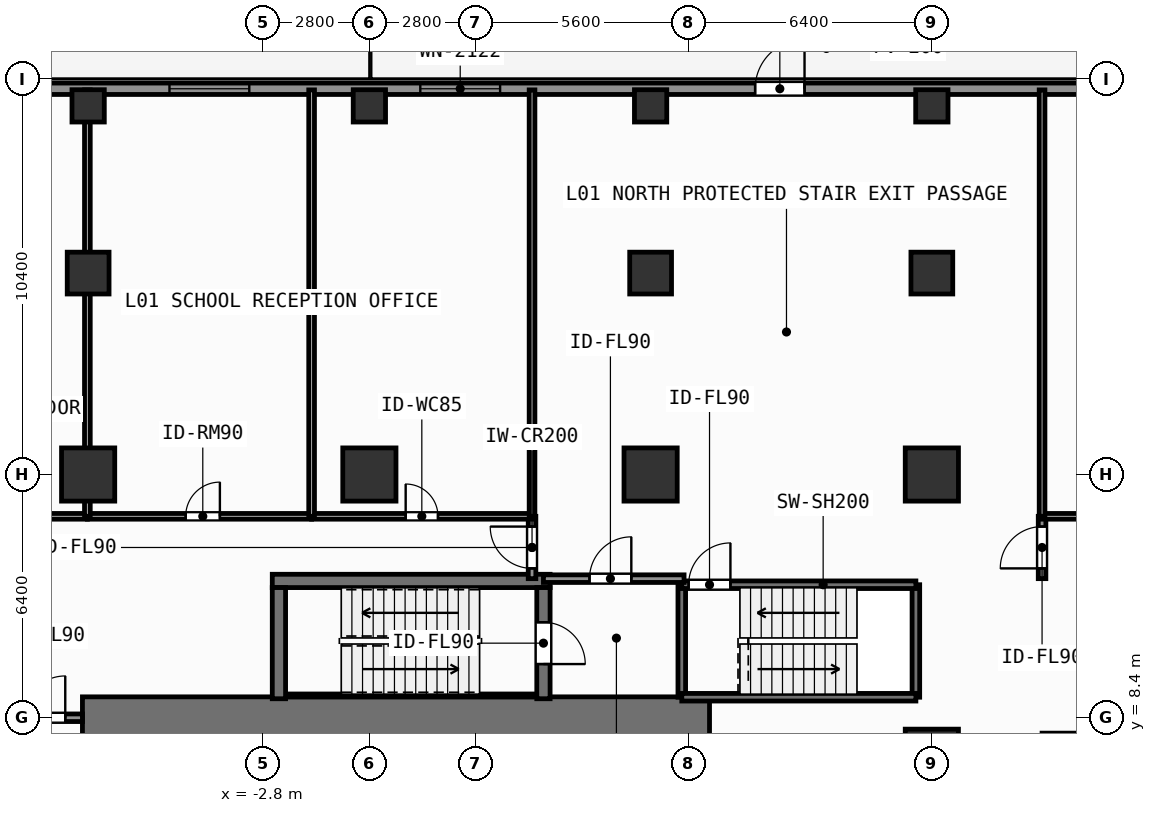
"""IFC4 building model, lengths in metres.
Left out: names, types, materials, properties, quantities, classifications, styles, units other than length and angle.
Written with IfcOpenShell. Run it as: python <this file> out.ifc"""

import sys

from ifc_helpers import new_model, si_unit, direction, frame, frame_2d, origin, origin_2d, place, context, subcontext, project, spatial, rectangle, extrude, element, fill, save


model = new_model("IFC4")
c1 = context("Model", 3, precision=1e-05, world=origin(), true_north=direction((0.0, 1.0)))
c2 = subcontext(c1, "Body", "Model", "MODEL_VIEW")
j1 = project(units=[si_unit("LENGTHUNIT", "METRE"), si_unit("PLANEANGLEUNIT", "RADIAN")], contexts=[c1])
p1 = place(None, origin())
s1 = spatial("IfcSite", under=j1, at=p1, CompositionType="ELEMENT")
p2 = place(p1, origin())
s2 = spatial("IfcBuilding", under=s1, at=p2, CompositionType="ELEMENT")
p3 = place(p2, origin())
s3 = spatial("IfcBuildingStorey", under=s2, at=p3, CompositionType="ELEMENT", Elevation=0.0)
p4 = place(p3, frame((-7.55, 8.4, 0.0), z_axis=(0.0, 0.0, 1.0), x_axis=(1.0, 0.0, 0.0)))
e1 = element("IfcWall", 1, at=p4, inside=s3, PredefinedType="SHEAR", context=c2, shape_type="SweptSolid", body=[
    extrude(rectangle(XDim=16.5, YDim=1.1, at=frame_2d((8.25, 0.0))), origin(), (0.0, 0.0, 1.0), 4.8),
])
p5 = place(p3, frame((-2.555, 12.0, 0.0), z_axis=(0.0, 0.0, 1.0), x_axis=(1.0, 0.0, 0.0)))
e2 = element("IfcWall", 2, at=p5, inside=s3, PredefinedType="SHEAR", context=c2, shape_type="SweptSolid", body=[
    extrude(rectangle(XDim=7.31, YDim=0.35, at=frame_2d((3.655, 0.0))), origin(), (0.0, 0.0, 1.0), 4.8),
])
p6 = place(p3, frame((-2.2, 8.988, 0.0), z_axis=(0.0, 0.0, 1.0), x_axis=(1.0, 0.0, 0.0)))
e3 = element("IfcWall", 3, at=p6, inside=s3, PredefinedType="SHEAR", context=c2, shape_type="SweptSolid", body=[
    extrude(rectangle(XDim=6.6, YDim=0.075, at=frame_2d((3.3, 0.0))), origin(), (0.0, 0.0, 1.0), 4.8),
])
p7 = place(p3, frame((-2.38, 8.9, 0.0), z_axis=(0.0, 0.0, 1.0), x_axis=(0.0, 1.0, 0.0)))
e4 = element("IfcWall", 4, at=p7, inside=s3, PredefinedType="SHEAR", context=c2, shape_type="SweptSolid", body=[
    extrude(rectangle(XDim=2.925, YDim=0.35, at=frame_2d((1.462, 0.0))), origin(), (0.0, 0.0, 1.0), 4.8),
])
p8 = place(p3, frame((4.58, 11.825, 0.0), z_axis=(0.0, 0.0, 1.0), x_axis=(0.0, -1.0, 0.0)))
e5 = element("IfcWall", 5, at=p8, inside=s3, PredefinedType="SHEAR", context=c2, shape_type="SweptSolid", body=[
    extrude(rectangle(XDim=2.925, YDim=0.35, at=frame_2d((1.462, 0.0))), origin(), (0.0, 0.0, 1.0), 4.8),
])
p9 = place(p8, frame((0.913, 0.0, 0.0)))
e6 = element("IfcOpeningElement", 6, at=p9, cuts=e5, PredefinedType="OPENING", context=c2, shape_type="SweptSolid", body=[
    extrude(rectangle(XDim=1.1, YDim=2.15, at=frame_2d((0.55, 1.075))), frame((0.0, 0.185, 0.0), z_axis=(0.0, -1.0, 0.0), x_axis=(1.0, 0.0, 0.0)), (0.0, 0.0, 1.0), 0.37),
])
for number, where, z_axis, x_axis in (
    (7, (-7.4, 14.8, 0.0), (0.0, 0.0, 1.0), (1.0, 0.0, 0.0)),
    (8, (0.0, 14.8, 0.0), (0.0, 0.0, 1.0), (1.0, 0.0, 0.0)),
    (9, (7.4, 14.8, 0.0), (0.0, 0.0, 1.0), (1.0, 0.0, 0.0)),
    (10, (14.8, 14.8, 0.0), (0.0, 0.0, 1.0), (1.0, 0.0, 0.0)),
    (11, (14.8, 7.4, 0.0), (0.0, 0.0, 1.0), (1.0, 0.0, 0.0)),
):
    element("IfcColumn", number, at=place(p3, frame(where, z_axis=z_axis, x_axis=x_axis)), inside=s3, PredefinedType="COLUMN", context=c2, shape_type="SweptSolid", body=[
        extrude(rectangle(XDim=1.4, YDim=1.4, at=origin_2d()), origin(), (0.0, 0.0, 1.0), 4.8),
    ])
for number, where, z_axis, x_axis in (
    (12, (-7.4, 20.1, 0.0), (0.0, 0.0, 1.0), (1.0, 0.0, 0.0)),
    (13, (7.4, 20.1, 0.0), (0.0, 0.0, 1.0), (1.0, 0.0, 0.0)),
    (14, (14.8, 20.1, 0.0), (0.0, 0.0, 1.0), (1.0, 0.0, 0.0)),
):
    element("IfcColumn", number, at=place(p3, frame(where, z_axis=z_axis, x_axis=x_axis)), inside=s3, PredefinedType="COLUMN", context=c2, shape_type="SweptSolid", body=[
        extrude(rectangle(XDim=1.1, YDim=1.1, at=origin_2d()), origin(), (0.0, 0.0, 1.0), 4.8),
    ])
for number, where, z_axis, x_axis in (
    (15, (-7.4, 24.5, 0.0), (0.0, 0.0, 1.0), (1.0, 0.0, 0.0)),
    (16, (0.0, 24.5, 0.0), (0.0, 0.0, 1.0), (1.0, 0.0, 0.0)),
    (17, (7.4, 24.5, 0.0), (0.0, 0.0, 1.0), (1.0, 0.0, 0.0)),
    (18, (14.8, 24.5, 0.0), (0.0, 0.0, 1.0), (1.0, 0.0, 0.0)),
):
    element("IfcColumn", number, at=place(p3, frame(where, z_axis=z_axis, x_axis=x_axis)), inside=s3, PredefinedType="COLUMN", context=c2, shape_type="SweptSolid", body=[
        extrude(rectangle(XDim=0.85, YDim=0.85, at=origin_2d()), origin(), (0.0, 0.0, 1.0), 4.8),
    ])
p10 = place(p3, frame((-29.1, 24.95, 0.0), z_axis=(0.0, 0.0, 1.0), x_axis=(1.0, 0.0, 0.0)))
e19 = element("IfcWall", 19, at=p10, inside=s3, PredefinedType="SOLIDWALL", context=c2, shape_type="SweptSolid", body=[
    extrude(rectangle(XDim=58.2, YDim=0.3, at=frame_2d((29.1, 0.0))), origin(), (0.0, 0.0, 1.0), 4.56),
])
p11 = place(p10, frame((10.9, 0.0, 0.85)))
e20 = element("IfcOpeningElement", 20, at=p11, cuts=e19, PredefinedType="OPENING", context=c2, shape_type="SweptSolid", body=[
    extrude(rectangle(XDim=2.1, YDim=2.2, at=frame_2d((1.05, 1.1))), frame((0.0, 0.16, 0.0), z_axis=(0.0, -1.0, 0.0), x_axis=(1.0, 0.0, 0.0)), (0.0, 0.0, 1.0), 0.32),
])
p12 = place(p10, frame((16.95, 0.0, 0.85)))
e21 = element("IfcOpeningElement", 21, at=p12, cuts=e19, PredefinedType="OPENING", context=c2, shape_type="SweptSolid", body=[
    extrude(rectangle(XDim=2.1, YDim=2.2, at=frame_2d((1.05, 1.1))), frame((0.0, 0.16, 0.0), z_axis=(0.0, -1.0, 0.0), x_axis=(1.0, 0.0, 0.0)), (0.0, 0.0, 1.0), 0.32),
])
p13 = place(p10, frame((23.84, 0.0, 0.85)))
e22 = element("IfcOpeningElement", 22, at=p13, cuts=e19, PredefinedType="OPENING", context=c2, shape_type="SweptSolid", body=[
    extrude(rectangle(XDim=2.1, YDim=2.2, at=frame_2d((1.05, 1.1))), frame((0.0, 0.16, 0.0), z_axis=(0.0, -1.0, 0.0), x_axis=(1.0, 0.0, 0.0)), (0.0, 0.0, 1.0), 0.32),
])
p14 = place(p10, frame((30.44, 0.0, 0.85)))
e23 = element("IfcOpeningElement", 23, at=p14, cuts=e19, PredefinedType="OPENING", context=c2, shape_type="SweptSolid", body=[
    extrude(rectangle(XDim=2.1, YDim=2.2, at=frame_2d((1.05, 1.1))), frame((0.0, 0.16, 0.0), z_axis=(0.0, -1.0, 0.0), x_axis=(1.0, 0.0, 0.0)), (0.0, 0.0, 1.0), 0.32),
])
p15 = place(p10, frame((39.25, 0.0, 0.0)))
e24 = element("IfcOpeningElement", 24, at=p15, cuts=e19, PredefinedType="OPENING", context=c2, shape_type="SweptSolid", body=[
    extrude(rectangle(XDim=1.3, YDim=2.2, at=frame_2d((0.65, 1.1))), frame((0.0, 0.16, 0.0), z_axis=(0.0, -1.0, 0.0), x_axis=(1.0, 0.0, 0.0)), (0.0, 0.0, 1.0), 0.32),
])
p16 = place(p10, frame((49.25, 0.0, 0.0)))
e25 = element("IfcOpeningElement", 25, at=p16, cuts=e19, PredefinedType="OPENING", context=c2, shape_type="SweptSolid", body=[
    extrude(rectangle(XDim=1.3, YDim=2.2, at=frame_2d((0.65, 1.1))), frame((0.0, 0.16, 0.0), z_axis=(0.0, -1.0, 0.0), x_axis=(1.0, 0.0, 0.0)), (0.0, 0.0, 1.0), 0.32),
])
for number, where, z_axis, x_axis in (
    (26, (8.22, 8.94, 0.0), (0.0, 0.0, 1.0), (0.0, 1.0, 0.0)),
    (27, (14.38, 11.9, 0.0), (0.0, 0.0, 1.0), (0.0, -1.0, 0.0)),
):
    element("IfcWall", number, at=place(p3, frame(where, z_axis=z_axis, x_axis=x_axis)), inside=s3, PredefinedType="SHEAR", context=c2, shape_type="SweptSolid", body=[
        extrude(rectangle(XDim=2.96, YDim=0.2, at=frame_2d((1.48, 0.0))), origin(), (0.0, 0.0, 1.0), 4.56),
    ])
p17 = place(p3, frame((14.38, 8.94, 0.0), z_axis=(0.0, 0.0, 1.0), x_axis=(-1.0, 0.0, 0.0)))
e28 = element("IfcWall", 28, at=p17, inside=s3, PredefinedType="SHEAR", context=c2, shape_type="SweptSolid", body=[
    extrude(rectangle(XDim=6.16, YDim=0.2, at=frame_2d((3.08, 0.0))), origin(), (0.0, 0.0, 1.0), 4.56),
])
p18 = place(p3, frame((8.22, 11.9, 0.0), z_axis=(0.0, 0.0, 1.0), x_axis=(1.0, 0.0, 0.0)))
e29 = element("IfcWall", 29, at=p18, inside=s3, PredefinedType="SHEAR", context=c2, shape_type="SweptSolid", body=[
    extrude(rectangle(XDim=6.16, YDim=0.2, at=frame_2d((3.08, 0.0))), origin(), (0.0, 0.0, 1.0), 4.56),
])
p19 = place(p18, frame((0.18, 0.0, 0.0)))
e30 = element("IfcOpeningElement", 30, at=p19, cuts=e29, PredefinedType="OPENING", context=c2, shape_type="SweptSolid", body=[
    extrude(rectangle(XDim=1.1, YDim=2.15, at=frame_2d((0.55, 1.075))), frame((0.0, 0.11, 0.0), z_axis=(0.0, -1.0, 0.0), x_axis=(1.0, 0.0, 0.0)), (0.0, 0.0, 1.0), 0.22),
])
p20 = place(p3, frame((4.58, 12.06, 0.0), z_axis=(0.0, 0.0, 1.0), x_axis=(1.0, 0.0, 0.0)))
e31 = element("IfcWall", 31, at=p20, inside=s3, PredefinedType="SOLIDWALL", context=c2, shape_type="SweptSolid", body=[
    extrude(rectangle(XDim=3.7, YDim=0.2, at=frame_2d((1.85, 0.0))), origin(), (0.0, 0.0, 1.0), 4.56),
])
p21 = place(p20, frame((1.212, 0.0, 0.0)))
e32 = element("IfcOpeningElement", 32, at=p21, cuts=e31, PredefinedType="OPENING", context=c2, shape_type="SweptSolid", body=[
    extrude(rectangle(XDim=1.1, YDim=2.15, at=frame_2d((0.55, 1.075))), frame((0.0, 0.11, 0.0), z_axis=(0.0, -1.0, 0.0), x_axis=(1.0, 0.0, 0.0)), (0.0, 0.0, 1.0), 0.22),
])
p22 = place(p3, frame((-9.7, 8.4, 0.0), z_axis=(0.0, 0.0, 1.0), x_axis=(1.0, 0.0, 0.0)))
e33 = element("IfcWall", 33, at=p22, inside=s3, PredefinedType="SOLIDWALL", context=c2, shape_type="SweptSolid", body=[
    extrude(rectangle(XDim=2.15, YDim=0.2, at=frame_2d((1.075, 0.0))), origin(), (0.0, 0.0, 1.0), 3.6),
])
p23 = place(p22, frame((0.598, 0.0, 0.0)))
e34 = element("IfcOpeningElement", 34, at=p23, cuts=e33, PredefinedType="OPENING", context=c2, shape_type="SweptSolid", body=[
    extrude(rectangle(XDim=1.1, YDim=2.15, at=frame_2d((0.55, 1.075))), frame((0.0, 0.11, 0.0), z_axis=(0.0, -1.0, 0.0), x_axis=(1.0, 0.0, 0.0)), (0.0, 0.0, 1.0), 0.22),
])
p24 = place(p3, frame((4.28, 12.06, 0.0), z_axis=(0.0, 0.0, 1.0), x_axis=(0.0, 1.0, 0.0)))
e35 = element("IfcWall", 35, at=p24, inside=s3, PredefinedType="SOLIDWALL", context=c2, shape_type="SweptSolid", body=[
    extrude(rectangle(XDim=1.64, YDim=0.2, at=frame_2d((0.82, 0.0))), origin(), (0.0, 0.0, 1.0), 4.56),
])
p25 = place(p24, frame((0.27, 0.0, 0.0)))
e36 = element("IfcOpeningElement", 36, at=p25, cuts=e35, PredefinedType="OPENING", context=c2, shape_type="SweptSolid", body=[
    extrude(rectangle(XDim=1.1, YDim=2.15, at=frame_2d((0.55, 1.075))), frame((0.0, 0.11, 0.0), z_axis=(0.0, -1.0, 0.0), x_axis=(1.0, 0.0, 0.0)), (0.0, 0.0, 1.0), 0.22),
])
p26 = place(p3, frame((17.7, 12.06, 0.0), z_axis=(0.0, 0.0, 1.0), x_axis=(0.0, 1.0, 0.0)))
e37 = element("IfcWall", 37, at=p26, inside=s3, PredefinedType="SOLIDWALL", context=c2, shape_type="SweptSolid", body=[
    extrude(rectangle(XDim=1.64, YDim=0.2, at=frame_2d((0.82, 0.0))), origin(), (0.0, 0.0, 1.0), 4.56),
])
p27 = place(p26, frame((0.27, 0.0, 0.0)))
e38 = element("IfcOpeningElement", 38, at=p27, cuts=e37, PredefinedType="OPENING", context=c2, shape_type="SweptSolid", body=[
    extrude(rectangle(XDim=1.1, YDim=2.15, at=frame_2d((0.55, 1.075))), frame((0.0, 0.11, 0.0), z_axis=(0.0, -1.0, 0.0), x_axis=(1.0, 0.0, 0.0)), (0.0, 0.0, 1.0), 0.22),
])
p28 = place(p3, frame((-19.42, 13.7, 0.0), z_axis=(0.0, 0.0, 1.0), x_axis=(1.0, 0.0, 0.0)))
e39 = element("IfcWall", 39, at=p28, inside=s3, PredefinedType="PARTITIONING", context=c2, shape_type="SweptSolid", body=[
    extrude(rectangle(XDim=12.0, YDim=0.15, at=frame_2d((6.0, 0.0))), origin(), (0.0, 0.0, 1.0), 4.56),
])
p29 = place(p28, frame((5.55, 0.0, 0.0)))
e40 = element("IfcOpeningElement", 40, at=p29, cuts=e39, PredefinedType="OPENING", context=c2, shape_type="SweptSolid", body=[
    extrude(rectangle(XDim=0.9, YDim=2.1, at=frame_2d((0.45, 1.05))), frame((0.0, 0.085, 0.0), z_axis=(0.0, -1.0, 0.0), x_axis=(1.0, 0.0, 0.0)), (0.0, 0.0, 1.0), 0.17),
])
p30 = place(p3, frame((-7.42, 13.7, 0.0), z_axis=(0.0, 0.0, 1.0), x_axis=(1.0, 0.0, 0.0)))
e41 = element("IfcWall", 41, at=p30, inside=s3, PredefinedType="PARTITIONING", context=c2, shape_type="SweptSolid", body=[
    extrude(rectangle(XDim=5.9, YDim=0.15, at=frame_2d((2.95, 0.0))), origin(), (0.0, 0.0, 1.0), 4.56),
])
p31 = place(p30, frame((2.587, 0.0, 0.0)))
e42 = element("IfcOpeningElement", 42, at=p31, cuts=e41, PredefinedType="OPENING", context=c2, shape_type="SweptSolid", body=[
    extrude(rectangle(XDim=0.9, YDim=2.1, at=frame_2d((0.45, 1.05))), frame((0.0, 0.085, 0.0), z_axis=(0.0, -1.0, 0.0), x_axis=(1.0, 0.0, 0.0)), (0.0, 0.0, 1.0), 0.17),
])
p32 = place(p3, frame((-1.52, 13.7, 0.0), z_axis=(0.0, 0.0, 1.0), x_axis=(1.0, 0.0, 0.0)))
e43 = element("IfcWall", 43, at=p32, inside=s3, PredefinedType="PARTITIONING", context=c2, shape_type="SweptSolid", body=[
    extrude(rectangle(XDim=5.8, YDim=0.15, at=frame_2d((2.9, 0.0))), origin(), (0.0, 0.0, 1.0), 4.56),
])
p33 = place(p32, frame((2.475, 0.0, 0.0)))
e44 = element("IfcOpeningElement", 44, at=p33, cuts=e43, PredefinedType="OPENING", context=c2, shape_type="SweptSolid", body=[
    extrude(rectangle(XDim=0.85, YDim=2.1, at=frame_2d((0.425, 1.05))), frame((0.0, 0.085, 0.0), z_axis=(0.0, -1.0, 0.0), x_axis=(1.0, 0.0, 0.0)), (0.0, 0.0, 1.0), 0.17),
])
p34 = place(p3, frame((17.7, 13.7, 0.0), z_axis=(0.0, 0.0, 1.0), x_axis=(1.0, 0.0, 0.0)))
e45 = element("IfcWall", 45, at=p34, inside=s3, PredefinedType="PARTITIONING", context=c2, shape_type="SweptSolid", body=[
    extrude(rectangle(XDim=7.88, YDim=0.15, at=frame_2d((3.94, 0.0))), origin(), (0.0, 0.0, 1.0), 4.56),
])
p35 = place(p34, frame((3.4, 0.0, 0.0)))
e46 = element("IfcOpeningElement", 46, at=p35, cuts=e45, PredefinedType="OPENING", context=c2, shape_type="SweptSolid", body=[
    extrude(rectangle(XDim=0.9, YDim=2.1, at=frame_2d((0.45, 1.05))), frame((0.0, 0.085, 0.0), z_axis=(0.0, -1.0, 0.0), x_axis=(1.0, 0.0, 0.0)), (0.0, 0.0, 1.0), 0.17),
])
p36 = place(p3, frame((-7.42, 13.7, 0.0), z_axis=(0.0, 0.0, 1.0), x_axis=(0.0, 1.0, 0.0)))
e47 = element("IfcWall", 47, at=p36, inside=s3, PredefinedType="PARTITIONING", context=c2, shape_type="SweptSolid", body=[
    extrude(rectangle(XDim=11.22, YDim=0.15, at=frame_2d((5.61, 0.0))), origin(), (0.0, 0.0, 1.0), 3.85),
])
for number, where, z_axis, x_axis in (
    (48, (-1.52, 13.7, 0.0), (0.0, 0.0, 1.0), (0.0, 1.0, 0.0)),
    (49, (4.28, 13.7, 0.0), (0.0, 0.0, 1.0), (0.0, 1.0, 0.0)),
    (50, (17.7, 13.7, 0.0), (0.0, 0.0, 1.0), (0.0, 1.0, 0.0)),
):
    element("IfcWall", number, at=place(p3, frame(where, z_axis=z_axis, x_axis=x_axis)), inside=s3, PredefinedType="PARTITIONING", context=c2, shape_type="SweptSolid", body=[
        extrude(rectangle(XDim=11.22, YDim=0.15, at=frame_2d((5.61, 0.0))), origin(), (0.0, 0.0, 1.0), 4.56),
    ])
p37 = place(p3, frame((17.7, 7.92, 0.0), z_axis=(0.0, 0.0, 1.0), x_axis=(1.0, 0.0, 0.0)))
e51 = element("IfcWall", 51, at=p37, inside=s3, PredefinedType="PARTITIONING", context=c2, shape_type="SweptSolid", body=[
    extrude(rectangle(XDim=15.72, YDim=0.15, at=frame_2d((7.86, 0.0))), origin(), (0.0, 0.0, 1.0), 4.56),
])
p38 = place(p13, origin())
e52 = element("IfcWindow", 52, at=p38, inside=s3, PartitioningType="SINGLE_PANEL", PredefinedType="WINDOW", context=c2, shape_type="SweptSolid", body=[
    extrude(rectangle(XDim=2.1, YDim=2.2, at=frame_2d((1.05, 1.1))), frame((0.0, 0.03, 0.0), z_axis=(0.0, -1.0, 0.0), x_axis=(1.0, 0.0, 0.0)), (0.0, 0.0, 1.0), 0.06),
])
fill(e22, e52)
p39 = place(p14, origin())
e53 = element("IfcWindow", 53, at=p39, inside=s3, PartitioningType="SINGLE_PANEL", PredefinedType="WINDOW", context=c2, shape_type="SweptSolid", body=[
    extrude(rectangle(XDim=2.1, YDim=2.2, at=frame_2d((1.05, 1.1))), frame((0.0, 0.03, 0.0), z_axis=(0.0, -1.0, 0.0), x_axis=(1.0, 0.0, 0.0)), (0.0, 0.0, 1.0), 0.06),
])
fill(e23, e53)
p40 = place(p15, origin())
e54 = element("IfcDoor", 54, at=p40, inside=s3, OperationType="SINGLE_SWING_RIGHT", PredefinedType="DOOR", context=c2, shape_type="SweptSolid", body=[
    extrude(rectangle(XDim=1.3, YDim=2.2, at=frame_2d((0.65, 1.1))), frame((0.0, 0.025, 0.0), z_axis=(0.0, -1.0, 0.0), x_axis=(1.0, 0.0, 0.0)), (0.0, 0.0, 1.0), 0.05),
])
fill(e24, e54)
p41 = place(p9, origin())
e55 = element("IfcDoor", 55, at=p41, inside=s3, OperationType="SINGLE_SWING_RIGHT", PredefinedType="DOOR", context=c2, shape_type="SweptSolid", body=[
    extrude(rectangle(XDim=1.1, YDim=2.15, at=frame_2d((0.55, 1.075))), frame((0.0, 0.025, 0.0), z_axis=(0.0, -1.0, 0.0), x_axis=(1.0, 0.0, 0.0)), (0.0, 0.0, 1.0), 0.05),
])
fill(e6, e55)
p42 = place(p19, origin())
e56 = element("IfcDoor", 56, at=p42, inside=s3, OperationType="SINGLE_SWING_RIGHT", PredefinedType="DOOR", context=c2, shape_type="SweptSolid", body=[
    extrude(rectangle(XDim=1.1, YDim=2.15, at=frame_2d((0.55, 1.075))), frame((0.0, 0.025, 0.0), z_axis=(0.0, -1.0, 0.0), x_axis=(1.0, 0.0, 0.0)), (0.0, 0.0, 1.0), 0.05),
])
fill(e30, e56)
p43 = place(p21, origin())
e57 = element("IfcDoor", 57, at=p43, inside=s3, OperationType="SINGLE_SWING_RIGHT", PredefinedType="DOOR", context=c2, shape_type="SweptSolid", body=[
    extrude(rectangle(XDim=1.1, YDim=2.15, at=frame_2d((0.55, 1.075))), frame((0.0, 0.025, 0.0), z_axis=(0.0, -1.0, 0.0), x_axis=(1.0, 0.0, 0.0)), (0.0, 0.0, 1.0), 0.05),
])
fill(e32, e57)
p44 = place(p23, origin())
e58 = element("IfcDoor", 58, at=p44, inside=s3, OperationType="SINGLE_SWING_RIGHT", PredefinedType="DOOR", context=c2, shape_type="SweptSolid", body=[
    extrude(rectangle(XDim=1.1, YDim=2.15, at=frame_2d((0.55, 1.075))), frame((0.0, 0.025, 0.0), z_axis=(0.0, -1.0, 0.0), x_axis=(1.0, 0.0, 0.0)), (0.0, 0.0, 1.0), 0.05),
])
fill(e34, e58)
p45 = place(p25, origin())
e59 = element("IfcDoor", 59, at=p45, inside=s3, OperationType="SINGLE_SWING_RIGHT", PredefinedType="DOOR", context=c2, shape_type="SweptSolid", body=[
    extrude(rectangle(XDim=1.1, YDim=2.15, at=frame_2d((0.55, 1.075))), frame((0.0, 0.025, 0.0), z_axis=(0.0, -1.0, 0.0), x_axis=(1.0, 0.0, 0.0)), (0.0, 0.0, 1.0), 0.05),
])
fill(e36, e59)
p46 = place(p27, origin())
e60 = element("IfcDoor", 60, at=p46, inside=s3, OperationType="SINGLE_SWING_LEFT", PredefinedType="DOOR", context=c2, shape_type="SweptSolid", body=[
    extrude(rectangle(XDim=1.1, YDim=2.15, at=frame_2d((0.55, 1.075))), frame((0.0, 0.025, 0.0), z_axis=(0.0, -1.0, 0.0), x_axis=(1.0, 0.0, 0.0)), (0.0, 0.0, 1.0), 0.05),
])
fill(e38, e60)
p47 = place(p31, origin())
e61 = element("IfcDoor", 61, at=p47, inside=s3, OperationType="SINGLE_SWING_RIGHT", PredefinedType="DOOR", context=c2, shape_type="SweptSolid", body=[
    extrude(rectangle(XDim=0.9, YDim=2.1, at=frame_2d((0.45, 1.05))), frame((0.0, 0.025, 0.0), z_axis=(0.0, -1.0, 0.0), x_axis=(1.0, 0.0, 0.0)), (0.0, 0.0, 1.0), 0.05),
])
fill(e42, e61)
p48 = place(p33, origin())
e62 = element("IfcDoor", 62, at=p48, inside=s3, OperationType="SINGLE_SWING_LEFT", PredefinedType="DOOR", context=c2, shape_type="SweptSolid", body=[
    extrude(rectangle(XDim=0.85, YDim=2.1, at=frame_2d((0.425, 1.05))), frame((0.0, 0.025, 0.0), z_axis=(0.0, -1.0, 0.0), x_axis=(1.0, 0.0, 0.0)), (0.0, 0.0, 1.0), 0.05),
])
fill(e44, e62)
save(model, sys.argv[1])
